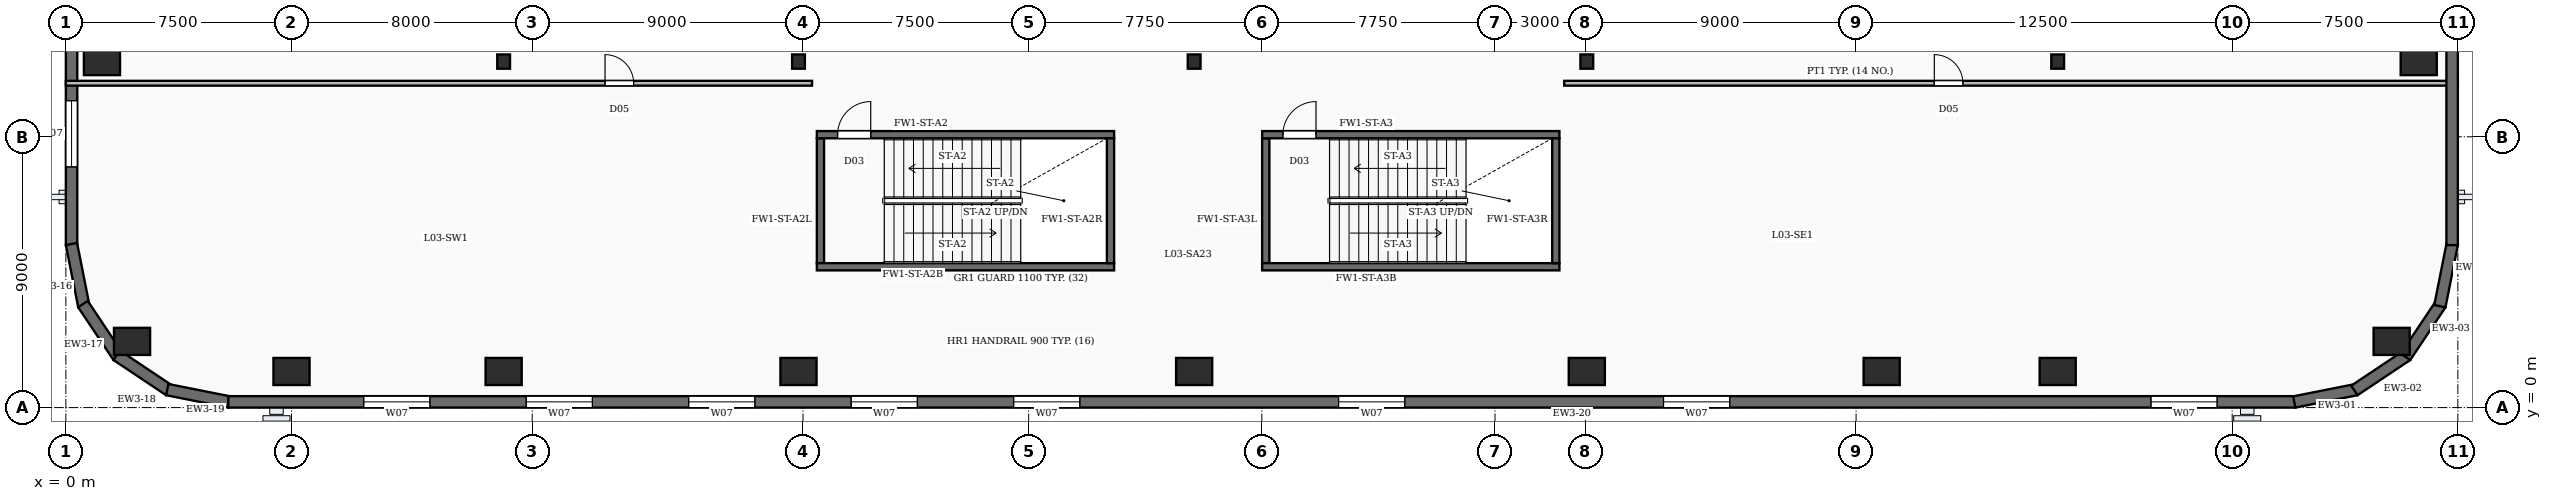
"""IFC4 building model, lengths in metres.
Left out: names, types, materials, properties, quantities, classifications, styles, units other than length and angle.
Written with IfcOpenShell. Run it as: python <this file> out.ifc"""

import sys

from ifc_helpers import new_model, si_unit, direction, frame, frame_2d, origin, origin_2d, place, context, subcontext, project, spatial, rectangle, i_section, extrude, element, fill, save


model = new_model("IFC4")
c1 = context("Model", 3, precision=1e-05, world=origin(), true_north=direction((0.0, 1.0)))
c2 = subcontext(c1, "Body", "Model", "MODEL_VIEW")
j1 = project(units=[si_unit("LENGTHUNIT", "METRE"), si_unit("PLANEANGLEUNIT", "RADIAN")], contexts=[c1])
p1 = place(None, origin())
s1 = spatial("IfcSite", under=j1, at=p1, CompositionType="ELEMENT")
p2 = place(p1, origin())
s2 = spatial("IfcBuilding", under=s1, at=p2, CompositionType="ELEMENT")
p3 = place(p2, frame((0.0, 0.0, 18.0)))
s3 = spatial("IfcBuildingStorey", under=s2, at=p3, CompositionType="ELEMENT", Elevation=18.0)
for number, where, z_axis, x_axis in (
    (1, (2.2, 2.2, -0.35), (0.0, 0.0, 1.0), (1.0, 0.0, 0.0)),
    (2, (7.5, 1.2, -0.35), (0.0, 0.0, 1.0), (1.0, 0.0, 0.0)),
    (3, (14.55, 1.2, -0.35), (0.0, 0.0, 1.0), (1.0, 0.0, 0.0)),
    (4, (24.35, 1.2, -0.35), (0.0, 0.0, 1.0), (1.0, 0.0, 0.0)),
    (5, (37.5, 1.2, -0.35), (0.0, 0.0, 1.0), (1.0, 0.0, 0.0)),
    (6, (50.55, 1.2, -0.35), (0.0, 0.0, 1.0), (1.0, 0.0, 0.0)),
    (7, (60.35, 1.2, -0.35), (0.0, 0.0, 1.0), (1.0, 0.0, 0.0)),
    (8, (66.2, 1.2, -0.35), (0.0, 0.0, 1.0), (1.0, 0.0, 0.0)),
    (9, (77.3, 2.2, -0.35), (0.0, 0.0, 1.0), (1.0, 0.0, 0.0)),
    (10, (78.2, 11.5, -0.35), (0.0, 0.0, 1.0), (1.0, 0.0, 0.0)),
    (11, (1.2, 11.5, -0.35), (0.0, 0.0, 1.0), (1.0, 0.0, 0.0)),
):
    element("IfcColumn", number, at=place(p3, frame(where, z_axis=z_axis, x_axis=x_axis)), inside=s3, PredefinedType="COLUMN", context=c2, shape_type="SweptSolid", body=[
        extrude(rectangle(XDim=1.2, YDim=0.9, at=origin_2d()), origin(), (0.0, 0.0, 1.0), 5.0),
    ])
for number, where, z_axis, x_axis in (
    (12, (14.55, 11.5, -0.35), (0.0, 0.0, 1.0), (1.0, 0.0, 0.0)),
    (13, (24.35, 11.5, -0.35), (0.0, 0.0, 1.0), (1.0, 0.0, 0.0)),
    (14, (37.5, 11.5, -0.35), (0.0, 0.0, 1.0), (1.0, 0.0, 0.0)),
    (15, (50.55, 11.5, -0.35), (0.0, 0.0, 1.0), (1.0, 0.0, 0.0)),
    (16, (66.2, 11.5, -0.35), (0.0, 0.0, 1.0), (1.0, 0.0, 0.0)),
):
    element("IfcColumn", number, at=place(p3, frame(where, z_axis=z_axis, x_axis=x_axis)), inside=s3, PredefinedType="COLUMN", context=c2, shape_type="SweptSolid", body=[
        extrude(i_section(OverallWidth=0.424, OverallDepth=0.474, WebThickness=0.048, FlangeThickness=0.077, FilletRadius=0.02, at=origin_2d()), origin(), (0.0, 0.0, 1.0), 5.0),
    ])
for number, where, z_axis, x_axis in (
    (17, (76.129, 0.597, 0.0), (0.0, 0.0, 1.0), (-0.981, -0.195, 0.0)),
    (18, (77.813, 1.74, 0.0), (0.0, 0.0, 1.0), (-0.832, -0.556, 0.0)),
    (19, (78.931, 3.439, 0.0), (0.0, 0.0, 1.0), (-0.556, -0.832, 0.0)),
    (20, (79.314, 5.437, 0.0), (0.0, 0.0, 1.0), (-0.195, -0.981, 0.0)),
):
    element("IfcWall", number, at=place(p3, frame(where, z_axis=z_axis, x_axis=x_axis)), inside=s3, PredefinedType="SOLIDWALL", context=c2, shape_type="SweptSolid", body=[
        extrude(rectangle(XDim=2.107, YDim=0.38, at=frame_2d((1.053, 0.0))), origin(), (0.0, 0.0, 1.0), 4.65),
    ])
p4 = place(p3, frame((79.31, 49.1, 0.0), z_axis=(0.0, 0.0, 1.0), x_axis=(0.0, -1.0, 0.0)))
e21 = element("IfcWall", 21, at=p4, inside=s3, PredefinedType="SOLIDWALL", context=c2, shape_type="SweptSolid", body=[
    extrude(rectangle(XDim=43.7, YDim=0.38, at=frame_2d((21.85, 0.0))), origin(), (0.0, 0.0, 1.0), 4.65),
])
p5 = place(p4, frame((2.6, 0.0, 0.95)))
e22 = element("IfcOpeningElement", 22, at=p5, cuts=e21, PredefinedType="OPENING", context=c2, shape_type="SweptSolid", body=[
    extrude(rectangle(XDim=2.2, YDim=2.5, at=frame_2d((1.1, 1.25))), frame((0.0, 0.2, 0.0), z_axis=(0.0, -1.0, 0.0), x_axis=(1.0, 0.0, 0.0)), (0.0, 0.0, 1.0), 0.4),
])
p6 = place(p4, frame((8.0, 0.0, 0.95)))
e23 = element("IfcOpeningElement", 23, at=p6, cuts=e21, PredefinedType="OPENING", context=c2, shape_type="SweptSolid", body=[
    extrude(rectangle(XDim=2.2, YDim=2.5, at=frame_2d((1.1, 1.25))), frame((0.0, 0.2, 0.0), z_axis=(0.0, -1.0, 0.0), x_axis=(1.0, 0.0, 0.0)), (0.0, 0.0, 1.0), 0.4),
])
p7 = place(p4, frame((29.6, 0.0, 0.95)))
e24 = element("IfcOpeningElement", 24, at=p7, cuts=e21, PredefinedType="OPENING", context=c2, shape_type="SweptSolid", body=[
    extrude(rectangle(XDim=2.2, YDim=2.5, at=frame_2d((1.1, 1.25))), frame((0.0, 0.2, 0.0), z_axis=(0.0, -1.0, 0.0), x_axis=(1.0, 0.0, 0.0)), (0.0, 0.0, 1.0), 0.4),
])
p8 = place(p3, frame((0.19, 5.4, 0.0), z_axis=(0.0, 0.0, 1.0), x_axis=(0.0, 1.0, 0.0)))
e25 = element("IfcWall", 25, at=p8, inside=s3, PredefinedType="SOLIDWALL", context=c2, shape_type="SweptSolid", body=[
    extrude(rectangle(XDim=43.7, YDim=0.38, at=frame_2d((21.85, 0.0))), origin(), (0.0, 0.0, 1.0), 4.65),
])
p9 = place(p8, frame((2.6, 0.0, 0.95)))
e26 = element("IfcOpeningElement", 26, at=p9, cuts=e25, PredefinedType="OPENING", context=c2, shape_type="SweptSolid", body=[
    extrude(rectangle(XDim=2.2, YDim=2.5, at=frame_2d((1.1, 1.25))), frame((0.0, 0.2, 0.0), z_axis=(0.0, -1.0, 0.0), x_axis=(1.0, 0.0, 0.0)), (0.0, 0.0, 1.0), 0.4),
])
p10 = place(p8, frame((8.0, 0.0, 0.95)))
e27 = element("IfcOpeningElement", 27, at=p10, cuts=e25, PredefinedType="OPENING", context=c2, shape_type="SweptSolid", body=[
    extrude(rectangle(XDim=2.2, YDim=2.5, at=frame_2d((1.1, 1.25))), frame((0.0, 0.2, 0.0), z_axis=(0.0, -1.0, 0.0), x_axis=(1.0, 0.0, 0.0)), (0.0, 0.0, 1.0), 0.4),
])
p11 = place(p8, frame((18.8, 0.0, 0.95)))
e28 = element("IfcOpeningElement", 28, at=p11, cuts=e25, PredefinedType="OPENING", context=c2, shape_type="SweptSolid", body=[
    extrude(rectangle(XDim=2.2, YDim=2.5, at=frame_2d((1.1, 1.25))), frame((0.0, 0.2, 0.0), z_axis=(0.0, -1.0, 0.0), x_axis=(1.0, 0.0, 0.0)), (0.0, 0.0, 1.0), 0.4),
])
p12 = place(p8, frame((29.6, 0.0, 0.95)))
e29 = element("IfcOpeningElement", 29, at=p12, cuts=e25, PredefinedType="OPENING", context=c2, shape_type="SweptSolid", body=[
    extrude(rectangle(XDim=2.2, YDim=2.5, at=frame_2d((1.1, 1.25))), frame((0.0, 0.2, 0.0), z_axis=(0.0, -1.0, 0.0), x_axis=(1.0, 0.0, 0.0)), (0.0, 0.0, 1.0), 0.4),
])
for number, where, z_axis, x_axis in (
    (30, (0.597, 3.371, 0.0), (0.0, 0.0, 1.0), (-0.195, 0.981, 0.0)),
    (31, (1.74, 1.687, 0.0), (0.0, 0.0, 1.0), (-0.556, 0.832, 0.0)),
    (32, (3.439, 0.569, 0.0), (0.0, 0.0, 1.0), (-0.832, 0.556, 0.0)),
    (33, (5.437, 0.186, 0.0), (0.0, 0.0, 1.0), (-0.981, 0.195, 0.0)),
):
    element("IfcWall", number, at=place(p3, frame(where, z_axis=z_axis, x_axis=x_axis)), inside=s3, PredefinedType="SOLIDWALL", context=c2, shape_type="SweptSolid", body=[
        extrude(rectangle(XDim=2.107, YDim=0.38, at=frame_2d((1.053, 0.0))), origin(), (0.0, 0.0, 1.0), 4.65),
    ])
p13 = place(p3, frame((74.1, 0.19, 0.0), z_axis=(0.0, 0.0, 1.0), x_axis=(-1.0, 0.0, 0.0)))
e34 = element("IfcWall", 34, at=p13, inside=s3, PredefinedType="SOLIDWALL", context=c2, shape_type="SweptSolid", body=[
    extrude(rectangle(XDim=68.7, YDim=0.38, at=frame_2d((34.35, 0.0))), origin(), (0.0, 0.0, 1.0), 4.65),
])
p14 = place(p13, frame((2.6, 0.0, 0.95)))
e35 = element("IfcOpeningElement", 35, at=p14, cuts=e34, PredefinedType="OPENING", context=c2, shape_type="SweptSolid", body=[
    extrude(rectangle(XDim=2.2, YDim=2.5, at=frame_2d((1.1, 1.25))), frame((0.0, 0.2, 0.0), z_axis=(0.0, -1.0, 0.0), x_axis=(1.0, 0.0, 0.0)), (0.0, 0.0, 1.0), 0.4),
])
p15 = place(p13, frame((18.8, 0.0, 0.95)))
e36 = element("IfcOpeningElement", 36, at=p15, cuts=e34, PredefinedType="OPENING", context=c2, shape_type="SweptSolid", body=[
    extrude(rectangle(XDim=2.2, YDim=2.5, at=frame_2d((1.1, 1.25))), frame((0.0, 0.2, 0.0), z_axis=(0.0, -1.0, 0.0), x_axis=(1.0, 0.0, 0.0)), (0.0, 0.0, 1.0), 0.4),
])
p16 = place(p13, frame((29.6, 0.0, 0.95)))
e37 = element("IfcOpeningElement", 37, at=p16, cuts=e34, PredefinedType="OPENING", context=c2, shape_type="SweptSolid", body=[
    extrude(rectangle(XDim=2.2, YDim=2.5, at=frame_2d((1.1, 1.25))), frame((0.0, 0.2, 0.0), z_axis=(0.0, -1.0, 0.0), x_axis=(1.0, 0.0, 0.0)), (0.0, 0.0, 1.0), 0.4),
])
p17 = place(p13, frame((40.4, 0.0, 0.95)))
e38 = element("IfcOpeningElement", 38, at=p17, cuts=e34, PredefinedType="OPENING", context=c2, shape_type="SweptSolid", body=[
    extrude(rectangle(XDim=2.2, YDim=2.5, at=frame_2d((1.1, 1.25))), frame((0.0, 0.2, 0.0), z_axis=(0.0, -1.0, 0.0), x_axis=(1.0, 0.0, 0.0)), (0.0, 0.0, 1.0), 0.4),
])
p18 = place(p13, frame((45.8, 0.0, 0.95)))
e39 = element("IfcOpeningElement", 39, at=p18, cuts=e34, PredefinedType="OPENING", context=c2, shape_type="SweptSolid", body=[
    extrude(rectangle(XDim=2.2, YDim=2.5, at=frame_2d((1.1, 1.25))), frame((0.0, 0.2, 0.0), z_axis=(0.0, -1.0, 0.0), x_axis=(1.0, 0.0, 0.0)), (0.0, 0.0, 1.0), 0.4),
])
p19 = place(p13, frame((51.2, 0.0, 0.95)))
e40 = element("IfcOpeningElement", 40, at=p19, cuts=e34, PredefinedType="OPENING", context=c2, shape_type="SweptSolid", body=[
    extrude(rectangle(XDim=2.2, YDim=2.5, at=frame_2d((1.1, 1.25))), frame((0.0, 0.2, 0.0), z_axis=(0.0, -1.0, 0.0), x_axis=(1.0, 0.0, 0.0)), (0.0, 0.0, 1.0), 0.4),
])
p20 = place(p13, frame((56.6, 0.0, 0.95)))
e41 = element("IfcOpeningElement", 41, at=p20, cuts=e34, PredefinedType="OPENING", context=c2, shape_type="SweptSolid", body=[
    extrude(rectangle(XDim=2.2, YDim=2.5, at=frame_2d((1.1, 1.25))), frame((0.0, 0.2, 0.0), z_axis=(0.0, -1.0, 0.0), x_axis=(1.0, 0.0, 0.0)), (0.0, 0.0, 1.0), 0.4),
])
p21 = place(p13, frame((62.0, 0.0, 0.95)))
e42 = element("IfcOpeningElement", 42, at=p21, cuts=e34, PredefinedType="OPENING", context=c2, shape_type="SweptSolid", body=[
    extrude(rectangle(XDim=2.2, YDim=2.5, at=frame_2d((1.1, 1.25))), frame((0.0, 0.2, 0.0), z_axis=(0.0, -1.0, 0.0), x_axis=(1.0, 0.0, 0.0)), (0.0, 0.0, 1.0), 0.4),
])
p22 = place(p3, frame((24.96, 9.07, 0.0), z_axis=(0.0, 0.0, 1.0), x_axis=(1.0, 0.0, 0.0)))
e43 = element("IfcWall", 43, at=p22, inside=s3, PredefinedType="SOLIDWALL", context=c2, shape_type="SweptSolid", body=[
    extrude(rectangle(XDim=9.88, YDim=0.24, at=frame_2d((4.94, 0.0))), origin(), (0.0, 0.0, 1.0), 4.65),
])
p23 = place(p22, frame((0.69, 0.0, 0.0)))
e44 = element("IfcOpeningElement", 44, at=p23, cuts=e43, PredefinedType="OPENING", context=c2, shape_type="SweptSolid", body=[
    extrude(rectangle(XDim=1.1, YDim=2.15, at=frame_2d((0.55, 1.075))), frame((0.0, 0.13, 0.0), z_axis=(0.0, -1.0, 0.0), x_axis=(1.0, 0.0, 0.0)), (0.0, 0.0, 1.0), 0.26),
])
p24 = place(p3, frame((24.96, 4.68, 0.0), z_axis=(0.0, 0.0, 1.0), x_axis=(1.0, 0.0, 0.0)))
e45 = element("IfcWall", 45, at=p24, inside=s3, PredefinedType="SOLIDWALL", context=c2, shape_type="SweptSolid", body=[
    extrude(rectangle(XDim=9.88, YDim=0.24, at=frame_2d((4.94, 0.0))), origin(), (0.0, 0.0, 1.0), 4.65),
])
for number, where, z_axis, x_axis in (
    (46, (25.08, 4.8, 0.0), (0.0, 0.0, 1.0), (0.0, 1.0, 0.0)),
    (47, (34.72, 4.8, 0.0), (0.0, 0.0, 1.0), (0.0, 1.0, 0.0)),
):
    element("IfcWall", number, at=place(p3, frame(where, z_axis=z_axis, x_axis=x_axis)), inside=s3, PredefinedType="SOLIDWALL", context=c2, shape_type="SweptSolid", body=[
        extrude(rectangle(XDim=4.15, YDim=0.24, at=frame_2d((2.075, 0.0))), origin(), (0.0, 0.0, 1.0), 4.65),
    ])
p25 = place(p3, frame((39.76, 9.07, 0.0), z_axis=(0.0, 0.0, 1.0), x_axis=(1.0, 0.0, 0.0)))
e48 = element("IfcWall", 48, at=p25, inside=s3, PredefinedType="SOLIDWALL", context=c2, shape_type="SweptSolid", body=[
    extrude(rectangle(XDim=9.88, YDim=0.24, at=frame_2d((4.94, 0.0))), origin(), (0.0, 0.0, 1.0), 4.65),
])
p26 = place(p25, frame((0.69, 0.0, 0.0)))
e49 = element("IfcOpeningElement", 49, at=p26, cuts=e48, PredefinedType="OPENING", context=c2, shape_type="SweptSolid", body=[
    extrude(rectangle(XDim=1.1, YDim=2.15, at=frame_2d((0.55, 1.075))), frame((0.0, 0.13, 0.0), z_axis=(0.0, -1.0, 0.0), x_axis=(1.0, 0.0, 0.0)), (0.0, 0.0, 1.0), 0.26),
])
p27 = place(p3, frame((39.76, 4.68, 0.0), z_axis=(0.0, 0.0, 1.0), x_axis=(1.0, 0.0, 0.0)))
e50 = element("IfcWall", 50, at=p27, inside=s3, PredefinedType="SOLIDWALL", context=c2, shape_type="SweptSolid", body=[
    extrude(rectangle(XDim=9.88, YDim=0.24, at=frame_2d((4.94, 0.0))), origin(), (0.0, 0.0, 1.0), 4.65),
])
for number, where, z_axis, x_axis in (
    (51, (39.88, 4.8, 0.0), (0.0, 0.0, 1.0), (0.0, 1.0, 0.0)),
    (52, (49.52, 4.8, 0.0), (0.0, 0.0, 1.0), (0.0, 1.0, 0.0)),
):
    element("IfcWall", number, at=place(p3, frame(where, z_axis=z_axis, x_axis=x_axis)), inside=s3, PredefinedType="SOLIDWALL", context=c2, shape_type="SweptSolid", body=[
        extrude(rectangle(XDim=4.15, YDim=0.24, at=frame_2d((2.075, 0.0))), origin(), (0.0, 0.0, 1.0), 4.65),
    ])
p28 = place(p3, frame((0.0, 10.78, 0.0), z_axis=(0.0, 0.0, 1.0), x_axis=(1.0, 0.0, 0.0)))
e53 = element("IfcWall", 53, at=p28, inside=s3, PredefinedType="PARTITIONING", context=c2, shape_type="SweptSolid", body=[
    extrude(rectangle(XDim=24.8, YDim=0.16, at=frame_2d((12.4, 0.0))), origin(), (0.0, 0.0, 1.0), 3.71),
])
p29 = place(p28, frame((17.92, 0.0, 0.0)))
e54 = element("IfcOpeningElement", 54, at=p29, cuts=e53, PredefinedType="OPENING", context=c2, shape_type="SweptSolid", body=[
    extrude(rectangle(XDim=0.95, YDim=2.15, at=frame_2d((0.475, 1.075))), frame((0.0, 0.09, 0.0), z_axis=(0.0, -1.0, 0.0), x_axis=(1.0, 0.0, 0.0)), (0.0, 0.0, 1.0), 0.18),
])
p30 = place(p3, frame((49.8, 10.78, 0.0), z_axis=(0.0, 0.0, 1.0), x_axis=(1.0, 0.0, 0.0)))
e55 = element("IfcWall", 55, at=p30, inside=s3, PredefinedType="PARTITIONING", context=c2, shape_type="SweptSolid", body=[
    extrude(rectangle(XDim=29.7, YDim=0.16, at=frame_2d((14.85, 0.0))), origin(), (0.0, 0.0, 1.0), 3.71),
])
p31 = place(p30, frame((12.3, 0.0, 0.0)))
e56 = element("IfcOpeningElement", 56, at=p31, cuts=e55, PredefinedType="OPENING", context=c2, shape_type="SweptSolid", body=[
    extrude(rectangle(XDim=0.95, YDim=2.15, at=frame_2d((0.475, 1.075))), frame((0.0, 0.09, 0.0), z_axis=(0.0, -1.0, 0.0), x_axis=(1.0, 0.0, 0.0)), (0.0, 0.0, 1.0), 0.18),
])
p32 = place(p9, origin())
e57 = element("IfcWindow", 57, at=p32, inside=s3, PartitioningType="DOUBLE_PANEL_VERTICAL", PredefinedType="WINDOW", context=c2, shape_type="SweptSolid", body=[
    extrude(rectangle(XDim=2.2, YDim=2.5, at=frame_2d((1.1, 1.25))), frame((0.0, 0.03, 0.0), z_axis=(0.0, -1.0, 0.0), x_axis=(1.0, 0.0, 0.0)), (0.0, 0.0, 1.0), 0.06),
])
fill(e26, e57)
p33 = place(p14, origin())
e58 = element("IfcWindow", 58, at=p33, inside=s3, PartitioningType="DOUBLE_PANEL_VERTICAL", PredefinedType="WINDOW", context=c2, shape_type="SweptSolid", body=[
    extrude(rectangle(XDim=2.2, YDim=2.5, at=frame_2d((1.1, 1.25))), frame((0.0, 0.03, 0.0), z_axis=(0.0, -1.0, 0.0), x_axis=(1.0, 0.0, 0.0)), (0.0, 0.0, 1.0), 0.06),
])
fill(e35, e58)
p34 = place(p15, origin())
e59 = element("IfcWindow", 59, at=p34, inside=s3, PartitioningType="DOUBLE_PANEL_VERTICAL", PredefinedType="WINDOW", context=c2, shape_type="SweptSolid", body=[
    extrude(rectangle(XDim=2.2, YDim=2.5, at=frame_2d((1.1, 1.25))), frame((0.0, 0.03, 0.0), z_axis=(0.0, -1.0, 0.0), x_axis=(1.0, 0.0, 0.0)), (0.0, 0.0, 1.0), 0.06),
])
fill(e36, e59)
p35 = place(p16, origin())
e60 = element("IfcWindow", 60, at=p35, inside=s3, PartitioningType="DOUBLE_PANEL_VERTICAL", PredefinedType="WINDOW", context=c2, shape_type="SweptSolid", body=[
    extrude(rectangle(XDim=2.2, YDim=2.5, at=frame_2d((1.1, 1.25))), frame((0.0, 0.03, 0.0), z_axis=(0.0, -1.0, 0.0), x_axis=(1.0, 0.0, 0.0)), (0.0, 0.0, 1.0), 0.06),
])
fill(e37, e60)
p36 = place(p17, origin())
e61 = element("IfcWindow", 61, at=p36, inside=s3, PartitioningType="DOUBLE_PANEL_VERTICAL", PredefinedType="WINDOW", context=c2, shape_type="SweptSolid", body=[
    extrude(rectangle(XDim=2.2, YDim=2.5, at=frame_2d((1.1, 1.25))), frame((0.0, 0.03, 0.0), z_axis=(0.0, -1.0, 0.0), x_axis=(1.0, 0.0, 0.0)), (0.0, 0.0, 1.0), 0.06),
])
fill(e38, e61)
p37 = place(p18, origin())
e62 = element("IfcWindow", 62, at=p37, inside=s3, PartitioningType="DOUBLE_PANEL_VERTICAL", PredefinedType="WINDOW", context=c2, shape_type="SweptSolid", body=[
    extrude(rectangle(XDim=2.2, YDim=2.5, at=frame_2d((1.1, 1.25))), frame((0.0, 0.03, 0.0), z_axis=(0.0, -1.0, 0.0), x_axis=(1.0, 0.0, 0.0)), (0.0, 0.0, 1.0), 0.06),
])
fill(e39, e62)
p38 = place(p19, origin())
e63 = element("IfcWindow", 63, at=p38, inside=s3, PartitioningType="DOUBLE_PANEL_VERTICAL", PredefinedType="WINDOW", context=c2, shape_type="SweptSolid", body=[
    extrude(rectangle(XDim=2.2, YDim=2.5, at=frame_2d((1.1, 1.25))), frame((0.0, 0.03, 0.0), z_axis=(0.0, -1.0, 0.0), x_axis=(1.0, 0.0, 0.0)), (0.0, 0.0, 1.0), 0.06),
])
fill(e40, e63)
p39 = place(p20, origin())
e64 = element("IfcWindow", 64, at=p39, inside=s3, PartitioningType="DOUBLE_PANEL_VERTICAL", PredefinedType="WINDOW", context=c2, shape_type="SweptSolid", body=[
    extrude(rectangle(XDim=2.2, YDim=2.5, at=frame_2d((1.1, 1.25))), frame((0.0, 0.03, 0.0), z_axis=(0.0, -1.0, 0.0), x_axis=(1.0, 0.0, 0.0)), (0.0, 0.0, 1.0), 0.06),
])
fill(e41, e64)
p40 = place(p21, origin())
e65 = element("IfcWindow", 65, at=p40, inside=s3, PartitioningType="DOUBLE_PANEL_VERTICAL", PredefinedType="WINDOW", context=c2, shape_type="SweptSolid", body=[
    extrude(rectangle(XDim=2.2, YDim=2.5, at=frame_2d((1.1, 1.25))), frame((0.0, 0.03, 0.0), z_axis=(0.0, -1.0, 0.0), x_axis=(1.0, 0.0, 0.0)), (0.0, 0.0, 1.0), 0.06),
])
fill(e42, e65)
p41 = place(p23, origin())
e66 = element("IfcDoor", 66, at=p41, inside=s3, OperationType="SINGLE_SWING_RIGHT", PredefinedType="DOOR", context=c2, shape_type="SweptSolid", body=[
    extrude(rectangle(XDim=1.1, YDim=2.15, at=frame_2d((0.55, 1.075))), frame((0.0, 0.025, 0.0), z_axis=(0.0, -1.0, 0.0), x_axis=(1.0, 0.0, 0.0)), (0.0, 0.0, 1.0), 0.05),
])
fill(e44, e66)
p42 = place(p26, origin())
e67 = element("IfcDoor", 67, at=p42, inside=s3, OperationType="SINGLE_SWING_RIGHT", PredefinedType="DOOR", context=c2, shape_type="SweptSolid", body=[
    extrude(rectangle(XDim=1.1, YDim=2.15, at=frame_2d((0.55, 1.075))), frame((0.0, 0.025, 0.0), z_axis=(0.0, -1.0, 0.0), x_axis=(1.0, 0.0, 0.0)), (0.0, 0.0, 1.0), 0.05),
])
fill(e49, e67)
p43 = place(p29, origin())
e68 = element("IfcDoor", 68, at=p43, inside=s3, OperationType="SINGLE_SWING_LEFT", PredefinedType="DOOR", context=c2, shape_type="SweptSolid", body=[
    extrude(rectangle(XDim=0.95, YDim=2.15, at=frame_2d((0.475, 1.075))), frame((0.0, 0.025, 0.0), z_axis=(0.0, -1.0, 0.0), x_axis=(1.0, 0.0, 0.0)), (0.0, 0.0, 1.0), 0.05),
])
fill(e54, e68)
p44 = place(p31, origin())
e69 = element("IfcDoor", 69, at=p44, inside=s3, OperationType="SINGLE_SWING_LEFT", PredefinedType="DOOR", context=c2, shape_type="SweptSolid", body=[
    extrude(rectangle(XDim=0.95, YDim=2.15, at=frame_2d((0.475, 1.075))), frame((0.0, 0.025, 0.0), z_axis=(0.0, -1.0, 0.0), x_axis=(1.0, 0.0, 0.0)), (0.0, 0.0, 1.0), 0.05),
])
fill(e56, e69)
save(model, sys.argv[1])
